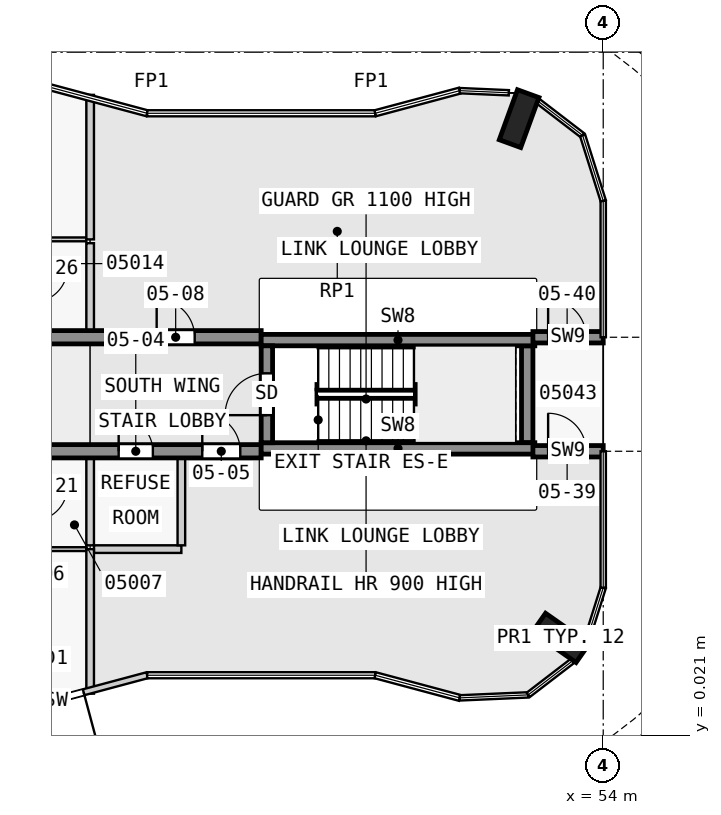
"""IFC4 building model, lengths in metres.
Left out: names, types, materials, properties, quantities, classifications, styles, units other than length and angle.
Written with IfcOpenShell. Run it as: python <this file> out.ifc"""

import sys

from ifc_helpers import new_model, si_unit, direction, frame, frame_2d, origin, origin_2d, place, context, subcontext, project, spatial, rectangle, extrude, element, fill, save


model = new_model("IFC4")
c1 = context("Model", 3, precision=1e-05, world=origin(), true_north=direction((0.0, 1.0)))
c2 = subcontext(c1, "Body", "Model", "MODEL_VIEW")
j1 = project(units=[si_unit("LENGTHUNIT", "METRE"), si_unit("PLANEANGLEUNIT", "RADIAN")], contexts=[c1])
p1 = place(None, origin())
s1 = spatial("IfcSite", under=j1, at=p1, CompositionType="ELEMENT")
p2 = place(p1, origin())
s2 = spatial("IfcBuilding", under=s1, at=p2, CompositionType="ELEMENT")
p3 = place(p2, frame((0.0, 0.0, 26.8)))
s3 = spatial("IfcBuildingStorey", under=s2, at=p3, CompositionType="ELEMENT", Elevation=26.8)
for number, where, z_axis, x_axis in (
    (1, (52.884, 2.59, 0.0), (0.0, 0.0, 1.0), (0.574, 0.819, 0.0)),
    (2, (51.787, 16.252, 0.0), (0.0, 0.0, 1.0), (-0.94, 0.342, 0.0)),
):
    element("IfcColumn", number, at=place(p3, frame(where, z_axis=z_axis, x_axis=x_axis)), inside=s3, PredefinedType="COLUMN", context=c2, shape_type="SweptSolid", body=[
        extrude(rectangle(XDim=0.6, YDim=1.4, at=origin_2d()), origin(), (0.0, 0.0, 1.0), 3.5),
    ])
p4 = place(p3, frame((45.15, 7.725, 0.0), z_axis=(0.0, 0.0, 1.0), x_axis=(0.0, 1.0, 0.0)))
e3 = element("IfcWall", 3, at=p4, inside=s3, PredefinedType="SHEAR", context=c2, shape_type="SweptSolid", body=[
    extrude(rectangle(XDim=2.55, YDim=0.3, at=frame_2d((1.275, 0.0))), origin(), (0.0, 0.0, 1.0), 3.5),
])
p5 = place(p4, frame((0.725, 0.0, 0.0)))
e4 = element("IfcOpeningElement", 4, at=p5, cuts=e3, PredefinedType="OPENING", context=c2, shape_type="SweptSolid", body=[
    extrude(rectangle(XDim=1.1, YDim=2.1, at=frame_2d((0.55, 1.05))), frame((0.0, 0.16, 0.0), z_axis=(0.0, -1.0, 0.0), x_axis=(1.0, 0.0, 0.0)), (0.0, 0.0, 1.0), 0.32),
])
p6 = place(p3, frame((52.0, 7.725, 0.0), z_axis=(0.0, 0.0, 1.0), x_axis=(0.0, 1.0, 0.0)))
e5 = element("IfcWall", 5, at=p6, inside=s3, PredefinedType="SHEAR", context=c2, shape_type="SweptSolid", body=[
    extrude(rectangle(XDim=2.55, YDim=0.3, at=frame_2d((1.275, 0.0))), origin(), (0.0, 0.0, 1.0), 3.5),
])
for number, where, z_axis, x_axis in (
    (6, (45.0, 7.575, 0.0), (0.0, 0.0, 1.0), (1.0, 0.0, 0.0)),
    (7, (45.0, 10.425, 0.0), (0.0, 0.0, 1.0), (1.0, 0.0, 0.0)),
):
    element("IfcWall", number, at=place(p3, frame(where, z_axis=z_axis, x_axis=x_axis)), inside=s3, PredefinedType="SHEAR", context=c2, shape_type="SweptSolid", body=[
        extrude(rectangle(XDim=7.2, YDim=0.3, at=frame_2d((3.6, 0.0))), origin(), (0.0, 0.0, 1.0), 3.5),
    ])
p7 = place(p3, frame((52.15, 7.5, -2.2), z_axis=(0.0, 0.0, 1.0), x_axis=(1.0, 0.0, 0.0)))
e8 = element("IfcWall", 8, at=p7, inside=s3, PredefinedType="SHEAR", context=c2, shape_type="SweptSolid", body=[
    extrude(rectangle(XDim=1.85, YDim=0.3, at=frame_2d((0.925, 0.0))), origin(), (0.0, 0.0, 1.0), 5.45),
])
p8 = place(p7, frame((0.4, 0.0, 2.2)))
e9 = element("IfcOpeningElement", 9, at=p8, cuts=e8, PredefinedType="OPENING", context=c2, shape_type="SweptSolid", body=[
    extrude(rectangle(XDim=1.0, YDim=2.1, at=frame_2d((0.5, 1.05))), frame((0.0, 0.16, 0.0), z_axis=(0.0, -1.0, 0.0), x_axis=(1.0, 0.0, 0.0)), (0.0, 0.0, 1.0), 0.32),
])
p9 = place(p3, frame((52.15, 10.5, -2.2), z_axis=(0.0, 0.0, 1.0), x_axis=(1.0, 0.0, 0.0)))
e10 = element("IfcWall", 10, at=p9, inside=s3, PredefinedType="SHEAR", context=c2, shape_type="SweptSolid", body=[
    extrude(rectangle(XDim=1.85, YDim=0.3, at=frame_2d((0.925, 0.0))), origin(), (0.0, 0.0, 1.0), 5.45),
])
p10 = place(p9, frame((0.4, 0.0, 2.2)))
e11 = element("IfcOpeningElement", 11, at=p10, cuts=e10, PredefinedType="OPENING", context=c2, shape_type="SweptSolid", body=[
    extrude(rectangle(XDim=1.0, YDim=2.1, at=frame_2d((0.5, 1.05))), frame((0.0, 0.16, 0.0), z_axis=(0.0, -1.0, 0.0), x_axis=(1.0, 0.0, 0.0)), (0.0, 0.0, 1.0), 0.32),
])
p11 = place(p3, frame((22.5, 7.5, 0.0), z_axis=(0.0, 0.0, 1.0), x_axis=(1.0, 0.0, 0.0)))
e12 = element("IfcWall", 12, at=p11, inside=s3, PredefinedType="SHEAR", context=c2, shape_type="SweptSolid", body=[
    extrude(rectangle(XDim=22.5, YDim=0.35, at=frame_2d((11.25, 0.0))), origin(), (0.0, 0.0, 1.0), 3.25),
])
p12 = place(p11, frame((4.05, 0.0, 0.0)))
e13 = element("IfcOpeningElement", 13, at=p12, cuts=e12, PredefinedType="OPENING", context=c2, shape_type="SweptSolid", body=[
    extrude(rectangle(XDim=1.0, YDim=2.1, at=frame_2d((0.5, 1.05))), frame((0.0, 0.185, 0.0), z_axis=(0.0, -1.0, 0.0), x_axis=(1.0, 0.0, 0.0)), (0.0, 0.0, 1.0), 0.37),
])
p13 = place(p11, frame((10.75, 0.0, 0.0)))
e14 = element("IfcOpeningElement", 14, at=p13, cuts=e12, PredefinedType="OPENING", context=c2, shape_type="SweptSolid", body=[
    extrude(rectangle(XDim=1.0, YDim=2.1, at=frame_2d((0.5, 1.05))), frame((0.0, 0.185, 0.0), z_axis=(0.0, -1.0, 0.0), x_axis=(1.0, 0.0, 0.0)), (0.0, 0.0, 1.0), 0.37),
])
p14 = place(p11, frame((15.25, 0.0, 0.0)))
e15 = element("IfcOpeningElement", 15, at=p14, cuts=e12, PredefinedType="OPENING", context=c2, shape_type="SweptSolid", body=[
    extrude(rectangle(XDim=1.0, YDim=2.1, at=frame_2d((0.5, 1.05))), frame((0.0, 0.185, 0.0), z_axis=(0.0, -1.0, 0.0), x_axis=(1.0, 0.0, 0.0)), (0.0, 0.0, 1.0), 0.37),
])
p15 = place(p11, frame((18.75, 0.0, 0.0)))
e16 = element("IfcOpeningElement", 16, at=p15, cuts=e12, PredefinedType="OPENING", context=c2, shape_type="SweptSolid", body=[
    extrude(rectangle(XDim=0.9, YDim=2.1, at=frame_2d((0.45, 1.05))), frame((0.0, 0.185, 0.0), z_axis=(0.0, -1.0, 0.0), x_axis=(1.0, 0.0, 0.0)), (0.0, 0.0, 1.0), 0.37),
])
p16 = place(p11, frame((20.95, 0.0, 0.0)))
e17 = element("IfcOpeningElement", 17, at=p16, cuts=e12, PredefinedType="OPENING", context=c2, shape_type="SweptSolid", body=[
    extrude(rectangle(XDim=1.0, YDim=2.1, at=frame_2d((0.5, 1.05))), frame((0.0, 0.185, 0.0), z_axis=(0.0, -1.0, 0.0), x_axis=(1.0, 0.0, 0.0)), (0.0, 0.0, 1.0), 0.37),
])
p17 = place(p3, frame((22.5, 10.5, 0.0), z_axis=(0.0, 0.0, 1.0), x_axis=(1.0, 0.0, 0.0)))
e18 = element("IfcWall", 18, at=p17, inside=s3, PredefinedType="SHEAR", context=c2, shape_type="SweptSolid", body=[
    extrude(rectangle(XDim=22.5, YDim=0.35, at=frame_2d((11.25, 0.0))), origin(), (0.0, 0.0, 1.0), 3.25),
])
p18 = place(p17, frame((6.05, 0.0, 0.0)))
e19 = element("IfcOpeningElement", 19, at=p18, cuts=e18, PredefinedType="OPENING", context=c2, shape_type="SweptSolid", body=[
    extrude(rectangle(XDim=1.0, YDim=2.1, at=frame_2d((0.5, 1.05))), frame((0.0, 0.185, 0.0), z_axis=(0.0, -1.0, 0.0), x_axis=(1.0, 0.0, 0.0)), (0.0, 0.0, 1.0), 0.37),
])
p19 = place(p17, frame((15.25, 0.0, 0.0)))
e20 = element("IfcOpeningElement", 20, at=p19, cuts=e18, PredefinedType="OPENING", context=c2, shape_type="SweptSolid", body=[
    extrude(rectangle(XDim=1.0, YDim=2.1, at=frame_2d((0.5, 1.05))), frame((0.0, 0.185, 0.0), z_axis=(0.0, -1.0, 0.0), x_axis=(1.0, 0.0, 0.0)), (0.0, 0.0, 1.0), 0.37),
])
p20 = place(p17, frame((19.75, 0.0, 0.0)))
e21 = element("IfcOpeningElement", 21, at=p20, cuts=e18, PredefinedType="OPENING", context=c2, shape_type="SweptSolid", body=[
    extrude(rectangle(XDim=1.0, YDim=2.1, at=frame_2d((0.5, 1.05))), frame((0.0, 0.185, 0.0), z_axis=(0.0, -1.0, 0.0), x_axis=(1.0, 0.0, 0.0)), (0.0, 0.0, 1.0), 0.37),
])
p21 = place(p3, frame((42.0, 1.607, 0.0), z_axis=(0.0, 0.0, 1.0), x_axis=(-0.965956335063, -0.258705157954, 0.0)))
e22 = element("IfcWall", 22, at=p21, inside=s3, PredefinedType="STANDARD", context=c2, shape_type="SweptSolid", body=[
    extrude(rectangle(XDim=5.261, YDim=0.16, at=frame_2d((2.631, 0.0))), origin(), (0.0, 0.0, 1.0), 3.25),
])
p22 = place(p21, frame((1.73, 0.0, 0.0)))
e23 = element("IfcOpeningElement", 23, at=p22, cuts=e22, PredefinedType="OPENING", context=c2, shape_type="SweptSolid", body=[
    extrude(rectangle(XDim=1.8, YDim=2.4, at=frame_2d((0.9, 1.2))), frame((0.0, 0.09, 0.0), z_axis=(0.0, -1.0, 0.0), x_axis=(1.0, 0.0, 0.0)), (0.0, 0.0, 1.0), 0.18),
])
p23 = place(p3, frame((39.05, 4.925, 0.0), z_axis=(0.0, 0.0, 1.0), x_axis=(1.0, 0.0, 0.0)))
e24 = element("IfcWall", 24, at=p23, inside=s3, PredefinedType="PARTITIONING", context=c2, shape_type="SweptSolid", body=[
    extrude(rectangle(XDim=1.35, YDim=0.1, at=frame_2d((0.675, 0.0))), origin(), (0.0, 0.0, 1.0), 3.25),
])
p24 = place(p3, frame((40.6, 4.925, 0.0), z_axis=(0.0, 0.0, 1.0), x_axis=(1.0, 0.0, 0.0)))
e25 = element("IfcWall", 25, at=p24, inside=s3, PredefinedType="PARTITIONING", context=c2, shape_type="SweptSolid", body=[
    extrude(rectangle(XDim=2.3, YDim=0.2, at=frame_2d((1.15, 0.0))), origin(), (0.0, 0.0, 1.0), 3.25),
])
p25 = place(p3, frame((40.4, 13.075, 0.0), z_axis=(0.0, 0.0, 1.0), x_axis=(-1.0, 0.0, 0.0)))
e26 = element("IfcWall", 26, at=p25, inside=s3, PredefinedType="PARTITIONING", context=c2, shape_type="SweptSolid", body=[
    extrude(rectangle(XDim=1.35, YDim=0.1, at=frame_2d((0.675, 0.0))), origin(), (0.0, 0.0, 1.0), 3.25),
])
for number, where, z_axis, x_axis in (
    (27, (40.5, 4.925, 0.0), (0.0, 0.0, 1.0), (0.0, -1.0, 0.0)),
    (28, (40.5, 16.878, 0.0), (0.0, 0.0, 1.0), (0.0, -1.0, 0.0)),
):
    element("IfcWall", number, at=place(p3, frame(where, z_axis=z_axis, x_axis=x_axis)), inside=s3, PredefinedType="PARTITIONING", context=c2, shape_type="SweptSolid", body=[
        extrude(rectangle(XDim=3.803, YDim=0.2, at=frame_2d((1.901, 0.0))), origin(), (0.0, 0.0, 1.0), 3.25),
    ])
for number, where, z_axis, x_axis in (
    (29, (40.5, 5.025, 0.0), (0.0, 0.0, 1.0), (0.0, 1.0, 0.0)),
    (30, (40.5, 10.675, 0.0), (0.0, 0.0, 1.0), (0.0, 1.0, 0.0)),
    (31, (42.9, 5.025, 0.0), (0.0, 0.0, 1.0), (0.0, 1.0, 0.0)),
):
    element("IfcWall", number, at=place(p3, frame(where, z_axis=z_axis, x_axis=x_axis)), inside=s3, PredefinedType="PARTITIONING", context=c2, shape_type="SweptSolid", body=[
        extrude(rectangle(XDim=2.3, YDim=0.2, at=frame_2d((1.15, 0.0))), origin(), (0.0, 0.0, 1.0), 3.25),
    ])
p26 = place(p22, origin())
e32 = element("IfcDoor", 32, at=p26, inside=s3, OperationType="SINGLE_SWING_LEFT", PredefinedType="DOOR", context=c2, shape_type="SweptSolid", body=[
    extrude(rectangle(XDim=1.8, YDim=2.4, at=frame_2d((0.9, 1.2))), frame((0.0, 0.025, 0.0), z_axis=(0.0, -1.0, 0.0), x_axis=(1.0, 0.0, 0.0)), (0.0, 0.0, 1.0), 0.05),
])
fill(e23, e32)
p27 = place(p5, origin())
e33 = element("IfcDoor", 33, at=p27, inside=s3, OperationType="SINGLE_SWING_LEFT", PredefinedType="DOOR", context=c2, shape_type="SweptSolid", body=[
    extrude(rectangle(XDim=1.1, YDim=2.1, at=frame_2d((0.55, 1.05))), frame((0.0, 0.025, 0.0), z_axis=(0.0, -1.0, 0.0), x_axis=(1.0, 0.0, 0.0)), (0.0, 0.0, 1.0), 0.05),
])
fill(e4, e33)
p28 = place(p15, origin())
e34 = element("IfcDoor", 34, at=p28, inside=s3, OperationType="SINGLE_SWING_RIGHT", PredefinedType="DOOR", context=c2, shape_type="SweptSolid", body=[
    extrude(rectangle(XDim=0.9, YDim=2.1, at=frame_2d((0.45, 1.05))), frame((0.0, 0.025, 0.0), z_axis=(0.0, -1.0, 0.0), x_axis=(1.0, 0.0, 0.0)), (0.0, 0.0, 1.0), 0.05),
])
fill(e16, e34)
p29 = place(p16, origin())
e35 = element("IfcDoor", 35, at=p29, inside=s3, OperationType="SINGLE_SWING_RIGHT", PredefinedType="DOOR", context=c2, shape_type="SweptSolid", body=[
    extrude(rectangle(XDim=1.0, YDim=2.1, at=frame_2d((0.5, 1.05))), frame((0.0, 0.025, 0.0), z_axis=(0.0, -1.0, 0.0), x_axis=(1.0, 0.0, 0.0)), (0.0, 0.0, 1.0), 0.05),
])
fill(e17, e35)
p30 = place(p20, origin())
e36 = element("IfcDoor", 36, at=p30, inside=s3, OperationType="SINGLE_SWING_RIGHT", PredefinedType="DOOR", context=c2, shape_type="SweptSolid", body=[
    extrude(rectangle(XDim=1.0, YDim=2.1, at=frame_2d((0.5, 1.05))), frame((0.0, 0.025, 0.0), z_axis=(0.0, -1.0, 0.0), x_axis=(1.0, 0.0, 0.0)), (0.0, 0.0, 1.0), 0.05),
])
fill(e21, e36)
p31 = place(p8, origin())
e37 = element("IfcDoor", 37, at=p31, inside=s3, OperationType="SINGLE_SWING_LEFT", PredefinedType="DOOR", context=c2, shape_type="SweptSolid", body=[
    extrude(rectangle(XDim=1.0, YDim=2.1, at=frame_2d((0.5, 1.05))), frame((0.0, 0.025, 0.0), z_axis=(0.0, -1.0, 0.0), x_axis=(1.0, 0.0, 0.0)), (0.0, 0.0, 1.0), 0.05),
])
fill(e9, e37)
p32 = place(p10, origin())
e38 = element("IfcDoor", 38, at=p32, inside=s3, OperationType="SINGLE_SWING_LEFT", PredefinedType="DOOR", context=c2, shape_type="SweptSolid", body=[
    extrude(rectangle(XDim=1.0, YDim=2.1, at=frame_2d((0.5, 1.05))), frame((0.0, 0.025, 0.0), z_axis=(0.0, -1.0, 0.0), x_axis=(1.0, 0.0, 0.0)), (0.0, 0.0, 1.0), 0.05),
])
fill(e11, e38)
save(model, sys.argv[1])
